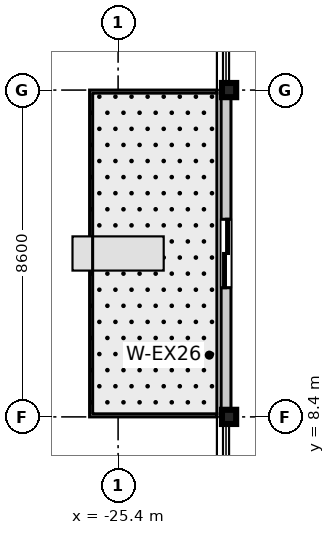
"""IFC4 building model, lengths in metres.
Left out: names, types, materials, properties, quantities, classifications, styles, units other than length and angle.
Written with IfcOpenShell. Run it as: python <this file> out.ifc"""

import sys

from ifc_helpers import new_model, si_unit, direction, frame, frame_2d, origin, origin_2d, place, context, subcontext, project, spatial, rectangle, i_section, extrude, source, transform, mapped, element, fill, save


model = new_model("IFC4")
c1 = context("Model", 3, precision=1e-05, world=origin(), true_north=direction((0.0, 1.0)))
c2 = subcontext(c1, "Body", "Model", "MODEL_VIEW")
j1 = project(units=[si_unit("LENGTHUNIT", "METRE"), si_unit("PLANEANGLEUNIT", "RADIAN")], contexts=[c1])
p1 = place(None, origin())
s1 = spatial("IfcSite", under=j1, at=p1, CompositionType="ELEMENT")
p2 = place(p1, origin())
s2 = spatial("IfcBuilding", under=s1, at=p2, CompositionType="ELEMENT")
p3 = place(p2, frame((0.0, 0.0, 288.8)))
s3 = spatial("IfcBuildingStorey", under=s2, at=p3, CompositionType="ELEMENT", Elevation=288.8)
m1 = source(origin(), c2, "Body", "SweptSolid", [
    extrude(i_section(OverallWidth=0.374, OverallDepth=0.374, WebThickness=0.014, FlangeThickness=0.023, at=origin_2d()), origin(), (0.0, 0.0, 1.0), 3.805),
])
for number, where, z_axis, x_axis in (
    (1, (-22.48, 8.4, 0.0), (0.0, 0.0, 1.0), (1.0, 0.0, 0.0)),
    (2, (-22.48, 17.0, 0.0), (0.0, 0.0, 1.0), (1.0, 0.0, 0.0)),
):
    element("IfcColumn", number, at=place(p3, frame(where, z_axis=z_axis, x_axis=x_axis)), inside=s3, PredefinedType="COLUMN", context=c2, shape_type="MappedRepresentation", body=[
        mapped(m1, transform((0.0, 0.0, 0.0), scale=1.0)),
    ])
m2 = source(origin(), c2, "Body", "SweptSolid", [
    extrude(rectangle(XDim=8.6, YDim=0.26, at=frame_2d((4.3, 0.0))), origin(), (0.0, 0.0, 1.0), 3.03),
])
p4 = place(p3, frame((-22.56, 8.4, 0.0), z_axis=(0.0, 0.0, 1.0), x_axis=(0.0, 1.0, 0.0)))
e3 = element("IfcWall", 3, at=p4, inside=s3, PredefinedType="STANDARD", context=c2, shape_type="MappedRepresentation", body=[
    mapped(m2, transform((0.0, 0.0, 0.0), scale=1.0)),
])
p5 = place(p4, frame((3.4, 0.0, 0.0)))
e4 = element("IfcOpeningElement", 4, at=p5, cuts=e3, PredefinedType="OPENING", context=c2, shape_type="SweptSolid", body=[
    extrude(rectangle(XDim=1.8, YDim=2.25, at=frame_2d((0.9, 1.125))), frame((0.0, 0.14, 0.0), z_axis=(0.0, -1.0, 0.0), x_axis=(1.0, 0.0, 0.0)), (0.0, 0.0, 1.0), 0.28),
])
m3 = source(origin(), c2, "Body", "SweptSolid", [
    extrude(rectangle(XDim=1.8, YDim=2.25, at=frame_2d((0.9, 1.125))), frame((0.0, 0.025, 0.0), z_axis=(0.0, -1.0, 0.0), x_axis=(1.0, 0.0, 0.0)), (0.0, 0.0, 1.0), 0.05),
])
p6 = place(p5, origin())
e5 = element("IfcDoor", 5, at=p6, inside=s3, OperationType="DOUBLE_DOOR_SLIDING", PredefinedType="DOOR", context=c2, shape_type="MappedRepresentation", body=[
    mapped(m3, transform((0.0, 0.0, 0.0), scale=1.0)),
])
fill(e4, e5)
save(model, sys.argv[1])
